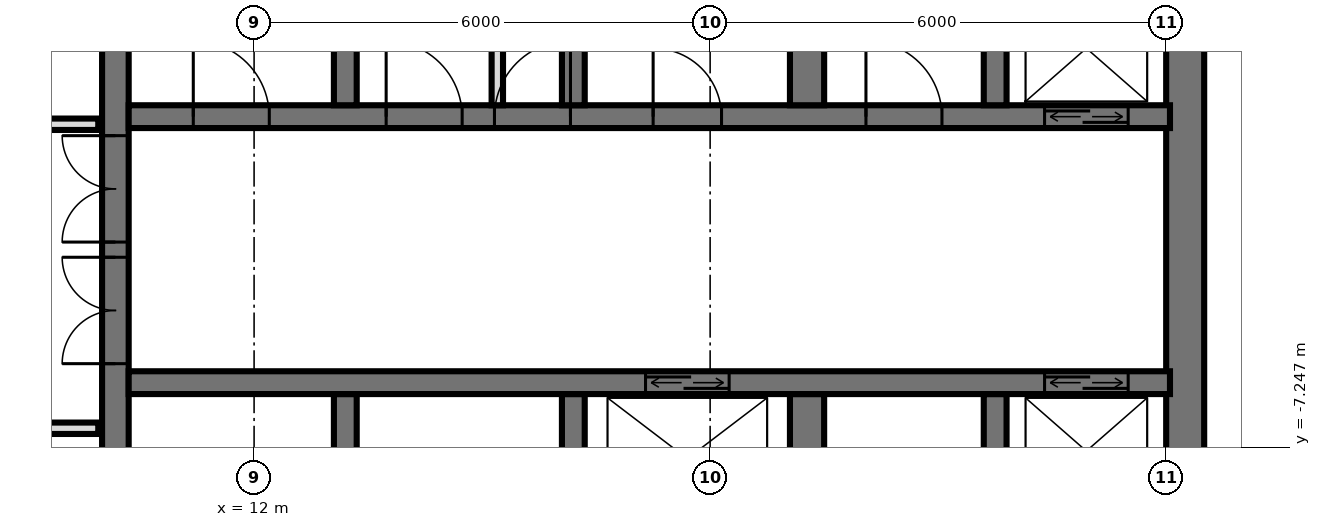
"""IFC4 building model, lengths in metres.
Left out: names, types, materials, properties, quantities, classifications, styles, units other than length and angle.
Written with IfcOpenShell. Run it as: python <this file> out.ifc"""

import sys

from ifc_helpers import new_model, si_unit, direction, frame, frame_2d, origin, place, context, subcontext, project, spatial, rectangle, extrude, element, fill, save


model = new_model("IFC4")
c1 = context("Model", 3, precision=1e-05, world=origin(), true_north=direction((0.0, 1.0)))
c2 = subcontext(c1, "Body", "Model", "MODEL_VIEW")
j1 = project(units=[si_unit("LENGTHUNIT", "METRE"), si_unit("PLANEANGLEUNIT", "RADIAN")], contexts=[c1])
p1 = place(None, origin())
s1 = spatial("IfcSite", under=j1, at=p1, CompositionType="ELEMENT")
p2 = place(p1, origin())
s2 = spatial("IfcBuilding", under=s1, at=p2, CompositionType="ELEMENT")
p3 = place(p2, frame((0.0, 0.0, 130.8)))
s3 = spatial("IfcBuildingStorey", under=s2, at=p3, CompositionType="ELEMENT", Elevation=130.8)
p4 = place(p3, frame((10.175, -14.55, 0.0), z_axis=(0.0, 0.0, 1.0), x_axis=(0.0, 1.0, 0.0)))
e1 = element("IfcWall", 1, at=p4, inside=s3, PredefinedType="SHEAR", context=c2, shape_type="SweptSolid", body=[
    extrude(rectangle(XDim=14.1, YDim=0.35, at=frame_2d((7.05, 0.0))), origin(), (0.0, 0.0, 1.0), 3.6),
])
p5 = place(p4, frame((8.4, 0.0, 0.0)))
e2 = element("IfcOpeningElement", 2, at=p5, cuts=e1, PredefinedType="OPENING", context=c2, shape_type="SweptSolid", body=[
    extrude(rectangle(XDim=1.4, YDim=2.4, at=frame_2d((0.7, 1.2))), frame((0.0, 0.185, 0.0), z_axis=(0.0, -1.0, 0.0), x_axis=(1.0, 0.0, 0.0)), (0.0, 0.0, 1.0), 0.37),
])
p6 = place(p4, frame((10.0, 0.0, 0.0)))
e3 = element("IfcOpeningElement", 3, at=p6, cuts=e1, PredefinedType="OPENING", context=c2, shape_type="SweptSolid", body=[
    extrude(rectangle(XDim=1.4, YDim=2.4, at=frame_2d((0.7, 1.2))), frame((0.0, 0.185, 0.0), z_axis=(0.0, -1.0, 0.0), x_axis=(1.0, 0.0, 0.0)), (0.0, 0.0, 1.0), 0.37),
])
p7 = place(p4, frame((4.0, 0.0, 0.0)))
e4 = element("IfcOpeningElement", 4, at=p7, cuts=e1, PredefinedType="OPENING", context=c2, shape_type="SweptSolid", body=[
    extrude(rectangle(XDim=1.2, YDim=2.1, at=frame_2d((0.6, 1.05))), frame((0.0, 0.185, 0.0), z_axis=(0.0, -1.0, 0.0), x_axis=(1.0, 0.0, 0.0)), (0.0, 0.0, 1.0), 0.37),
])
p8 = place(p3, frame((24.25, -14.55, 0.0), z_axis=(0.0, 0.0, 1.0), x_axis=(0.0, 1.0, 0.0)))
e5 = element("IfcWall", 5, at=p8, inside=s3, PredefinedType="SHEAR", context=c2, shape_type="SweptSolid", body=[
    extrude(rectangle(XDim=14.1, YDim=0.5, at=frame_2d((7.05, 0.0))), origin(), (0.0, 0.0, 1.0), 3.6),
])
p9 = place(p3, frame((10.35, -2.9, 0.0), z_axis=(0.0, 0.0, 1.0), x_axis=(1.0, 0.0, 0.0)))
e6 = element("IfcWall", 6, at=p9, inside=s3, PredefinedType="SHEAR", context=c2, shape_type="SweptSolid", body=[
    extrude(rectangle(XDim=13.7, YDim=0.3, at=frame_2d((6.85, 0.0))), origin(), (0.0, 0.0, 1.0), 3.6),
])
p10 = place(p9, frame((12.05, 0.0, 0.0)))
e7 = element("IfcOpeningElement", 7, at=p10, cuts=e6, PredefinedType="OPENING", context=c2, shape_type="SweptSolid", body=[
    extrude(rectangle(XDim=1.1, YDim=2.1, at=frame_2d((0.55, 1.05))), frame((0.0, 0.16, 0.0), z_axis=(0.0, -1.0, 0.0), x_axis=(1.0, 0.0, 0.0)), (0.0, 0.0, 1.0), 0.32),
])
p11 = place(p9, frame((6.9, 0.0, 0.0)))
e8 = element("IfcOpeningElement", 8, at=p11, cuts=e6, PredefinedType="OPENING", context=c2, shape_type="SweptSolid", body=[
    extrude(rectangle(XDim=0.9, YDim=2.1, at=frame_2d((0.45, 1.05))), frame((0.0, 0.16, 0.0), z_axis=(0.0, -1.0, 0.0), x_axis=(1.0, 0.0, 0.0)), (0.0, 0.0, 1.0), 0.32),
])
p12 = place(p9, frame((0.85, 0.0, 0.0)))
e9 = element("IfcOpeningElement", 9, at=p12, cuts=e6, PredefinedType="OPENING", context=c2, shape_type="SweptSolid", body=[
    extrude(rectangle(XDim=1.0, YDim=2.1, at=frame_2d((0.5, 1.05))), frame((0.0, 0.16, 0.0), z_axis=(0.0, -1.0, 0.0), x_axis=(1.0, 0.0, 0.0)), (0.0, 0.0, 1.0), 0.32),
])
p13 = place(p9, frame((3.387, 0.0, 0.0)))
e10 = element("IfcOpeningElement", 10, at=p13, cuts=e6, PredefinedType="OPENING", context=c2, shape_type="SweptSolid", body=[
    extrude(rectangle(XDim=1.0, YDim=2.1, at=frame_2d((0.5, 1.05))), frame((0.0, 0.16, 0.0), z_axis=(0.0, -1.0, 0.0), x_axis=(1.0, 0.0, 0.0)), (0.0, 0.0, 1.0), 0.32),
])
p14 = place(p9, frame((4.812, 0.0, 0.0)))
e11 = element("IfcOpeningElement", 11, at=p14, cuts=e6, PredefinedType="OPENING", context=c2, shape_type="SweptSolid", body=[
    extrude(rectangle(XDim=1.0, YDim=2.1, at=frame_2d((0.5, 1.05))), frame((0.0, 0.16, 0.0), z_axis=(0.0, -1.0, 0.0), x_axis=(1.0, 0.0, 0.0)), (0.0, 0.0, 1.0), 0.32),
])
p15 = place(p9, frame((9.7, 0.0, 0.0)))
e12 = element("IfcOpeningElement", 12, at=p15, cuts=e6, PredefinedType="OPENING", context=c2, shape_type="SweptSolid", body=[
    extrude(rectangle(XDim=1.0, YDim=2.1, at=frame_2d((0.5, 1.05))), frame((0.0, 0.16, 0.0), z_axis=(0.0, -1.0, 0.0), x_axis=(1.0, 0.0, 0.0)), (0.0, 0.0, 1.0), 0.32),
])
p16 = place(p3, frame((10.35, -6.4, 0.0), z_axis=(0.0, 0.0, 1.0), x_axis=(1.0, 0.0, 0.0)))
e13 = element("IfcWall", 13, at=p16, inside=s3, PredefinedType="SHEAR", context=c2, shape_type="SweptSolid", body=[
    extrude(rectangle(XDim=13.7, YDim=0.3, at=frame_2d((6.85, 0.0))), origin(), (0.0, 0.0, 1.0), 3.6),
])
p17 = place(p16, frame((12.05, 0.0, 0.0)))
e14 = element("IfcOpeningElement", 14, at=p17, cuts=e13, PredefinedType="OPENING", context=c2, shape_type="SweptSolid", body=[
    extrude(rectangle(XDim=1.1, YDim=2.1, at=frame_2d((0.55, 1.05))), frame((0.0, 0.16, 0.0), z_axis=(0.0, -1.0, 0.0), x_axis=(1.0, 0.0, 0.0)), (0.0, 0.0, 1.0), 0.32),
])
p18 = place(p16, frame((6.8, 0.0, 0.0)))
e15 = element("IfcOpeningElement", 15, at=p18, cuts=e13, PredefinedType="OPENING", context=c2, shape_type="SweptSolid", body=[
    extrude(rectangle(XDim=1.1, YDim=2.1, at=frame_2d((0.55, 1.05))), frame((0.0, 0.16, 0.0), z_axis=(0.0, -1.0, 0.0), x_axis=(1.0, 0.0, 0.0)), (0.0, 0.0, 1.0), 0.32),
])
for number, where, z_axis, x_axis in (
    (16, (13.2, -2.75, 0.0), (0.0, 0.0, 1.0), (0.0, 1.0, 0.0)),
    (17, (13.2, -8.85, 0.0), (0.0, 0.0, 1.0), (0.0, 1.0, 0.0)),
    (18, (16.2, -2.75, 0.0), (0.0, 0.0, 1.0), (0.0, 1.0, 0.0)),
    (19, (16.2, -8.85, 0.0), (0.0, 0.0, 1.0), (0.0, 1.0, 0.0)),
):
    element("IfcWall", number, at=place(p3, frame(where, z_axis=z_axis, x_axis=x_axis)), inside=s3, PredefinedType="SHEAR", context=c2, shape_type="SweptSolid", body=[
        extrude(rectangle(XDim=2.3, YDim=0.3, at=frame_2d((1.15, 0.0))), origin(), (0.0, 0.0, 1.0), 3.6),
    ])
for number, where, z_axis, x_axis in (
    (20, (19.275, -2.75, 0.0), (0.0, 0.0, 1.0), (0.0, 1.0, 0.0)),
    (21, (19.275, -8.85, 0.0), (0.0, 0.0, 1.0), (0.0, 1.0, 0.0)),
):
    element("IfcWall", number, at=place(p3, frame(where, z_axis=z_axis, x_axis=x_axis)), inside=s3, PredefinedType="SHEAR", context=c2, shape_type="SweptSolid", body=[
        extrude(rectangle(XDim=2.3, YDim=0.45, at=frame_2d((1.15, 0.0))), origin(), (0.0, 0.0, 1.0), 3.6),
    ])
for number, where, z_axis, x_axis in (
    (22, (21.75, -2.75, 0.0), (0.0, 0.0, 1.0), (0.0, 1.0, 0.0)),
    (23, (21.75, -8.85, 0.0), (0.0, 0.0, 1.0), (0.0, 1.0, 0.0)),
):
    element("IfcWall", number, at=place(p3, frame(where, z_axis=z_axis, x_axis=x_axis)), inside=s3, PredefinedType="SHEAR", context=c2, shape_type="SweptSolid", body=[
        extrude(rectangle(XDim=2.3, YDim=0.3, at=frame_2d((1.15, 0.0))), origin(), (0.0, 0.0, 1.0), 3.6),
    ])
p19 = place(p3, frame((15.2, -2.75, 0.0), z_axis=(0.0, 0.0, 1.0), x_axis=(0.0, 1.0, 0.0)))
e24 = element("IfcWall", 24, at=p19, inside=s3, PredefinedType="PARTITIONING", context=c2, shape_type="SweptSolid", body=[
    extrude(rectangle(XDim=2.3, YDim=0.15, at=frame_2d((1.15, 0.0))), origin(), (0.0, 0.0, 1.0), 3.3),
])
p20 = place(p3, frame((-9.95, -7.0, 0.0), z_axis=(0.0, 0.0, 1.0), x_axis=(1.0, 0.0, 0.0)))
e25 = element("IfcWall", 25, at=p20, inside=s3, PredefinedType="PARTITIONING", context=c2, shape_type="SweptSolid", body=[
    extrude(rectangle(XDim=19.9, YDim=0.15, at=frame_2d((9.95, 0.0))), origin(), (0.0, 0.0, 1.0), 3.32),
])
p21 = place(p20, frame((9.45, 0.0, 0.0)))
e26 = element("IfcOpeningElement", 26, at=p21, cuts=e25, PredefinedType="OPENING", context=c2, shape_type="SweptSolid", body=[
    extrude(rectangle(XDim=1.0, YDim=2.1, at=frame_2d((0.5, 1.05))), frame((0.0, 0.085, 0.0), z_axis=(0.0, -1.0, 0.0), x_axis=(1.0, 0.0, 0.0)), (0.0, 0.0, 1.0), 0.17),
])
p22 = place(p20, frame((15.45, 0.0, 0.0)))
e27 = element("IfcOpeningElement", 27, at=p22, cuts=e25, PredefinedType="OPENING", context=c2, shape_type="SweptSolid", body=[
    extrude(rectangle(XDim=1.0, YDim=2.1, at=frame_2d((0.5, 1.05))), frame((0.0, 0.085, 0.0), z_axis=(0.0, -1.0, 0.0), x_axis=(1.0, 0.0, 0.0)), (0.0, 0.0, 1.0), 0.17),
])
p23 = place(p3, frame((-9.95, -3.0, 0.0), z_axis=(0.0, 0.0, 1.0), x_axis=(1.0, 0.0, 0.0)))
e28 = element("IfcWall", 28, at=p23, inside=s3, PredefinedType="PARTITIONING", context=c2, shape_type="SweptSolid", body=[
    extrude(rectangle(XDim=19.9, YDim=0.15, at=frame_2d((9.95, 0.0))), origin(), (0.0, 0.0, 1.0), 3.32),
])
p24 = place(p23, frame((1.7, 0.0, 0.0)))
e29 = element("IfcOpeningElement", 29, at=p24, cuts=e28, PredefinedType="OPENING", context=c2, shape_type="SweptSolid", body=[
    extrude(rectangle(XDim=1.0, YDim=2.1, at=frame_2d((0.5, 1.05))), frame((0.0, 0.085, 0.0), z_axis=(0.0, -1.0, 0.0), x_axis=(1.0, 0.0, 0.0)), (0.0, 0.0, 1.0), 0.17),
])
p25 = place(p23, frame((5.45, 0.0, 0.0)))
e30 = element("IfcOpeningElement", 30, at=p25, cuts=e28, PredefinedType="OPENING", context=c2, shape_type="SweptSolid", body=[
    extrude(rectangle(XDim=1.0, YDim=2.1, at=frame_2d((0.5, 1.05))), frame((0.0, 0.085, 0.0), z_axis=(0.0, -1.0, 0.0), x_axis=(1.0, 0.0, 0.0)), (0.0, 0.0, 1.0), 0.17),
])
p26 = place(p23, frame((8.2, 0.0, 0.0)))
e31 = element("IfcOpeningElement", 31, at=p26, cuts=e28, PredefinedType="OPENING", context=c2, shape_type="SweptSolid", body=[
    extrude(rectangle(XDim=1.0, YDim=2.1, at=frame_2d((0.5, 1.05))), frame((0.0, 0.085, 0.0), z_axis=(0.0, -1.0, 0.0), x_axis=(1.0, 0.0, 0.0)), (0.0, 0.0, 1.0), 0.17),
])
p27 = place(p23, frame((11.95, 0.0, 0.0)))
e32 = element("IfcOpeningElement", 32, at=p27, cuts=e28, PredefinedType="OPENING", context=c2, shape_type="SweptSolid", body=[
    extrude(rectangle(XDim=1.0, YDim=2.1, at=frame_2d((0.5, 1.05))), frame((0.0, 0.085, 0.0), z_axis=(0.0, -1.0, 0.0), x_axis=(1.0, 0.0, 0.0)), (0.0, 0.0, 1.0), 0.17),
])
p28 = place(p23, frame((16.95, 0.0, 0.0)))
e33 = element("IfcOpeningElement", 33, at=p28, cuts=e28, PredefinedType="OPENING", context=c2, shape_type="SweptSolid", body=[
    extrude(rectangle(XDim=1.0, YDim=2.1, at=frame_2d((0.5, 1.05))), frame((0.0, 0.085, 0.0), z_axis=(0.0, -1.0, 0.0), x_axis=(1.0, 0.0, 0.0)), (0.0, 0.0, 1.0), 0.17),
])
p29 = place(p10, origin())
e34 = element("IfcDoor", 34, at=p29, inside=s3, OperationType="DOUBLE_DOOR_SLIDING", PredefinedType="USERDEFINED", context=c2, shape_type="SweptSolid", body=[
    extrude(rectangle(XDim=1.1, YDim=2.1, at=frame_2d((0.55, 1.05))), frame((0.0, 0.025, 0.0), z_axis=(0.0, -1.0, 0.0), x_axis=(1.0, 0.0, 0.0)), (0.0, 0.0, 1.0), 0.05),
])
fill(e7, e34)
p30 = place(p17, origin())
e35 = element("IfcDoor", 35, at=p30, inside=s3, OperationType="DOUBLE_DOOR_SLIDING", PredefinedType="USERDEFINED", context=c2, shape_type="SweptSolid", body=[
    extrude(rectangle(XDim=1.1, YDim=2.1, at=frame_2d((0.55, 1.05))), frame((0.0, 0.025, 0.0), z_axis=(0.0, -1.0, 0.0), x_axis=(1.0, 0.0, 0.0)), (0.0, 0.0, 1.0), 0.05),
])
fill(e14, e35)
p31 = place(p18, origin())
e36 = element("IfcDoor", 36, at=p31, inside=s3, OperationType="DOUBLE_DOOR_SLIDING", PredefinedType="USERDEFINED", context=c2, shape_type="SweptSolid", body=[
    extrude(rectangle(XDim=1.1, YDim=2.1, at=frame_2d((0.55, 1.05))), frame((0.0, 0.025, 0.0), z_axis=(0.0, -1.0, 0.0), x_axis=(1.0, 0.0, 0.0)), (0.0, 0.0, 1.0), 0.05),
])
fill(e15, e36)
p32 = place(p5, origin())
e37 = element("IfcDoor", 37, at=p32, inside=s3, OperationType="DOUBLE_DOOR_SINGLE_SWING", PredefinedType="DOOR", context=c2, shape_type="SweptSolid", body=[
    extrude(rectangle(XDim=1.4, YDim=2.4, at=frame_2d((0.7, 1.2))), frame((0.0, 0.025, 0.0), z_axis=(0.0, -1.0, 0.0), x_axis=(1.0, 0.0, 0.0)), (0.0, 0.0, 1.0), 0.05),
])
fill(e2, e37)
p33 = place(p6, origin())
e38 = element("IfcDoor", 38, at=p33, inside=s3, OperationType="DOUBLE_DOOR_SINGLE_SWING", PredefinedType="DOOR", context=c2, shape_type="SweptSolid", body=[
    extrude(rectangle(XDim=1.4, YDim=2.4, at=frame_2d((0.7, 1.2))), frame((0.0, 0.025, 0.0), z_axis=(0.0, -1.0, 0.0), x_axis=(1.0, 0.0, 0.0)), (0.0, 0.0, 1.0), 0.05),
])
fill(e3, e38)
p34 = place(p11, origin())
e39 = element("IfcDoor", 39, at=p34, inside=s3, OperationType="SINGLE_SWING_RIGHT", PredefinedType="DOOR", context=c2, shape_type="SweptSolid", body=[
    extrude(rectangle(XDim=0.9, YDim=2.1, at=frame_2d((0.45, 1.05))), frame((0.0, 0.025, 0.0), z_axis=(0.0, -1.0, 0.0), x_axis=(1.0, 0.0, 0.0)), (0.0, 0.0, 1.0), 0.05),
])
fill(e8, e39)
p35 = place(p12, origin())
e40 = element("IfcDoor", 40, at=p35, inside=s3, OperationType="SINGLE_SWING_RIGHT", PredefinedType="DOOR", context=c2, shape_type="SweptSolid", body=[
    extrude(rectangle(XDim=1.0, YDim=2.1, at=frame_2d((0.5, 1.05))), frame((0.0, 0.025, 0.0), z_axis=(0.0, -1.0, 0.0), x_axis=(1.0, 0.0, 0.0)), (0.0, 0.0, 1.0), 0.05),
])
fill(e9, e40)
p36 = place(p13, origin())
e41 = element("IfcDoor", 41, at=p36, inside=s3, OperationType="SINGLE_SWING_RIGHT", PredefinedType="DOOR", context=c2, shape_type="SweptSolid", body=[
    extrude(rectangle(XDim=1.0, YDim=2.1, at=frame_2d((0.5, 1.05))), frame((0.0, 0.025, 0.0), z_axis=(0.0, -1.0, 0.0), x_axis=(1.0, 0.0, 0.0)), (0.0, 0.0, 1.0), 0.05),
])
fill(e10, e41)
p37 = place(p14, origin())
e42 = element("IfcDoor", 42, at=p37, inside=s3, OperationType="SINGLE_SWING_LEFT", PredefinedType="DOOR", context=c2, shape_type="SweptSolid", body=[
    extrude(rectangle(XDim=1.0, YDim=2.1, at=frame_2d((0.5, 1.05))), frame((0.0, 0.025, 0.0), z_axis=(0.0, -1.0, 0.0), x_axis=(1.0, 0.0, 0.0)), (0.0, 0.0, 1.0), 0.05),
])
fill(e11, e42)
p38 = place(p15, origin())
e43 = element("IfcDoor", 43, at=p38, inside=s3, OperationType="SINGLE_SWING_RIGHT", PredefinedType="DOOR", context=c2, shape_type="SweptSolid", body=[
    extrude(rectangle(XDim=1.0, YDim=2.1, at=frame_2d((0.5, 1.05))), frame((0.0, 0.025, 0.0), z_axis=(0.0, -1.0, 0.0), x_axis=(1.0, 0.0, 0.0)), (0.0, 0.0, 1.0), 0.05),
])
fill(e12, e43)
save(model, sys.argv[1])
